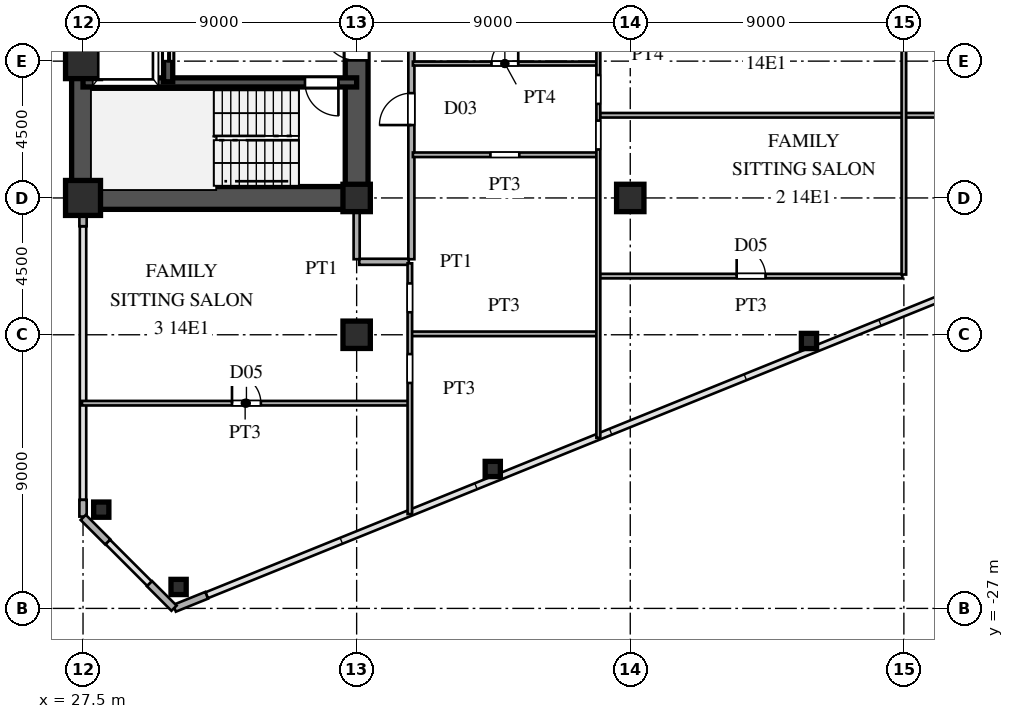
"""IFC4 building model, lengths in metres.
Left out: names, types, materials, properties, quantities, classifications, styles, units other than length and angle.
Written with IfcOpenShell. Run it as: python <this file> out.ifc"""

import sys

from ifc_helpers import new_model, si_unit, direction, frame, frame_2d, origin, origin_2d, place, context, subcontext, project, spatial, rectangle, hollow_rectangle, i_section, extrude, source, transform, mapped, element, fill, save


model = new_model("IFC4")
c1 = context("Model", 3, precision=1e-05, world=origin(), true_north=direction((0.0, 1.0)))
c2 = subcontext(c1, "Body", "Model", "MODEL_VIEW")
j1 = project(units=[si_unit("LENGTHUNIT", "METRE"), si_unit("PLANEANGLEUNIT", "RADIAN")], contexts=[c1])
p1 = place(None, origin())
s1 = spatial("IfcSite", under=j1, at=p1, CompositionType="ELEMENT")
p2 = place(p1, origin())
s2 = spatial("IfcBuilding", under=s1, at=p2, CompositionType="ELEMENT")
p3 = place(p2, frame((0.0, 0.0, 54.9)))
s3 = spatial("IfcBuildingStorey", under=s2, at=p3, CompositionType="ELEMENT", Elevation=54.9)
m1 = source(origin(), c2, "Body", "SweptSolid", [
    extrude(hollow_rectangle(XDim=1.15, YDim=1.15, WallThickness=0.048, at=origin_2d()), origin(), (0.0, 0.0, 1.0), 3.6),
])
for number, where, z_axis, x_axis in (
    (1, (27.5, -13.5, 0.0), (0.0, 0.0, 1.0), (1.0, 0.0, 0.0)),
    (2, (27.5, -9.0, 0.0), (0.0, 0.0, 1.0), (1.0, 0.0, 0.0)),
):
    element("IfcColumn", number, at=place(p3, frame(where, z_axis=z_axis, x_axis=x_axis)), inside=s3, PredefinedType="COLUMN", context=c2, shape_type="MappedRepresentation", body=[
        mapped(m1, transform((0.0, 0.0, 0.0), scale=1.0)),
    ])
m2 = source(origin(), c2, "Body", "SweptSolid", [
    extrude(i_section(OverallWidth=0.9, OverallDepth=0.9, WebThickness=0.036, FlangeThickness=0.055, at=origin_2d()), origin(), (0.0, 0.0, 1.0), 3.6),
])
for number, where, z_axis, x_axis in (
    (3, (36.5, -18.0, 0.0), (0.0, 0.0, 1.0), (1.0, 0.0, 0.0)),
    (4, (36.5, -13.5, 0.0), (0.0, 0.0, 1.0), (1.0, 0.0, 0.0)),
    (5, (45.5, -13.5, 0.0), (0.0, 0.0, 1.0), (1.0, 0.0, 0.0)),
):
    element("IfcColumn", number, at=place(p3, frame(where, z_axis=z_axis, x_axis=x_axis)), inside=s3, PredefinedType="COLUMN", context=c2, shape_type="MappedRepresentation", body=[
        mapped(m2, transform((0.0, 0.0, 0.0), scale=1.0)),
    ])
m3 = source(origin(), c2, "Body", "SweptSolid", [
    extrude(hollow_rectangle(XDim=0.5, YDim=0.5, WallThickness=0.02, at=origin_2d()), origin(), (0.0, 0.0, 1.0), 3.6),
])
for number, where, z_axis, x_axis in (
    (6, (30.643, -26.295, 0.0), (0.0, 0.0, 1.0), (1.0, 0.0, 0.0)),
    (7, (28.1, -23.751, 0.0), (0.0, 0.0, 1.0), (1.0, 0.0, 0.0)),
    (8, (40.977, -22.414, 0.0), (0.0, 0.0, 1.0), (1.0, 0.0, 0.0)),
    (9, (51.378, -18.204, 0.0), (0.0, 0.0, 1.0), (1.0, 0.0, 0.0)),
):
    element("IfcColumn", number, at=place(p3, frame(where, z_axis=z_axis, x_axis=x_axis)), inside=s3, PredefinedType="COLUMN", context=c2, shape_type="MappedRepresentation", body=[
        mapped(m3, transform((0.0, 0.0, 0.0), scale=1.0)),
    ])
p4 = place(p3, frame((30.509, -26.996, 0.0), z_axis=(0.0, 0.0, 1.0), x_axis=(0.927007103665, 0.375043770452, 0.0)))
e10 = element("IfcWall", 10, at=p4, inside=s3, PredefinedType="SOLIDWALL", context=c2, shape_type="SweptSolid", body=[
    extrude(rectangle(XDim=1.14, YDim=0.24, at=frame_2d((0.57, 0.0))), origin(), (0.0, 0.0, 1.0), 3.38),
])
p5 = place(p3, frame((27.5, -23.98, 0.0), z_axis=(0.0, 0.0, 1.0), x_axis=(0.0, 1.0, 0.0)))
e11 = element("IfcWall", 11, at=p5, inside=s3, PredefinedType="SOLIDWALL", context=c2, shape_type="SweptSolid", body=[
    extrude(rectangle(XDim=0.55, YDim=0.24, at=frame_2d((0.275, 0.0))), origin(), (0.0, 0.0, 1.0), 3.38),
])
p6 = place(p3, frame((27.5, -14.43, 0.0), z_axis=(0.0, 0.0, 1.0), x_axis=(0.0, 1.0, 0.0)))
e12 = element("IfcWall", 12, at=p6, inside=s3, PredefinedType="SOLIDWALL", context=c2, shape_type="SweptSolid", body=[
    extrude(rectangle(XDim=0.55, YDim=0.24, at=frame_2d((0.275, 0.0))), origin(), (0.0, 0.0, 1.0), 2.88),
])
for number, where, z_axis, x_axis in (
    (13, (27.507, -24.007, 0.0), (0.0, 0.0, 1.0), (0.707, -0.707, 0.0)),
    (14, (29.687, -26.187, 0.0), (0.0, 0.0, 1.0), (0.707, -0.707, 0.0)),
):
    element("IfcWall", number, at=place(p3, frame(where, z_axis=z_axis, x_axis=x_axis)), inside=s3, PredefinedType="SOLIDWALL", context=c2, shape_type="SweptSolid", body=[
        extrude(rectangle(XDim=1.14, YDim=0.24, at=frame_2d((0.57, 0.0))), origin(), (0.0, 0.0, 1.0), 3.38),
    ])
p7 = place(p3, frame((27.5, -13.5, 0.0), z_axis=(0.0, 0.0, 1.0), x_axis=(0.0, 1.0, 0.0)))
e15 = element("IfcWall", 15, at=p7, inside=s3, PredefinedType="SHEAR", context=c2, shape_type="SweptSolid", body=[
    extrude(rectangle(XDim=12.2, YDim=0.75, at=frame_2d((6.1, 0.0))), origin(), (0.0, 0.0, 1.0), 3.38),
])
p8 = place(p3, frame((27.5, -13.5, 0.0), z_axis=(0.0, 0.0, 1.0), x_axis=(1.0, 0.0, 0.0)))
e16 = element("IfcWall", 16, at=p8, inside=s3, PredefinedType="SHEAR", context=c2, shape_type="SweptSolid", body=[
    extrude(rectangle(XDim=9.0, YDim=0.75, at=frame_2d((4.5, 0.0))), origin(), (0.0, 0.0, 1.0), 3.38),
])
p9 = place(p3, frame((36.5, -13.65, 0.0), z_axis=(0.0, 0.0, 1.0), x_axis=(0.0, 1.0, 0.0)))
e17 = element("IfcWall", 17, at=p9, inside=s3, PredefinedType="SHEAR", context=c2, shape_type="SweptSolid", body=[
    extrude(rectangle(XDim=7.15, YDim=0.75, at=frame_2d((3.575, 0.0))), origin(), (0.0, 0.0, 1.0), 3.38),
])
p10 = place(p9, frame((4.675, 0.0, 0.0)))
e18 = element("IfcOpeningElement", 18, at=p10, cuts=e17, PredefinedType="OPENING", context=c2, shape_type="SweptSolid", body=[
    extrude(rectangle(XDim=1.15, YDim=2.2, at=frame_2d((0.575, 1.1))), frame((0.0, 0.385, 0.0), z_axis=(0.0, -1.0, 0.0), x_axis=(1.0, 0.0, 0.0)), (0.0, 0.0, 1.0), 0.77),
])
p11 = place(p3, frame((27.5, -9.7, 0.0), z_axis=(0.0, 0.0, 1.0), x_axis=(1.0, 0.0, 0.0)))
e19 = element("IfcWall", 19, at=p11, inside=s3, PredefinedType="SHEAR", context=c2, shape_type="SweptSolid", body=[
    extrude(rectangle(XDim=9.0, YDim=0.3, at=frame_2d((4.5, 0.0))), origin(), (0.0, 0.0, 1.0), 3.38),
])
p12 = place(p11, frame((7.3, 0.0, 0.0)))
e20 = element("IfcOpeningElement", 20, at=p12, cuts=e19, PredefinedType="OPENING", context=c2, shape_type="SweptSolid", body=[
    extrude(rectangle(XDim=1.1, YDim=2.2, at=frame_2d((0.55, 1.1))), frame((0.0, 0.16, 0.0), z_axis=(0.0, -1.0, 0.0), x_axis=(1.0, 0.0, 0.0)), (0.0, 0.0, 1.0), 0.32),
])
p13 = place(p3, frame((30.3, -9.68, 0.0), z_axis=(0.0, 0.0, 1.0), x_axis=(0.0, 1.0, 0.0)))
e21 = element("IfcWall", 21, at=p13, inside=s3, PredefinedType="SHEAR", context=c2, shape_type="SweptSolid", body=[
    extrude(rectangle(XDim=2.56, YDim=0.3, at=frame_2d((1.28, 0.0))), origin(), (0.0, 0.0, 1.0), 3.38),
])
p14 = place(p13, frame((0.68, 0.0, 0.0)))
e22 = element("IfcOpeningElement", 22, at=p14, cuts=e21, PredefinedType="OPENING", context=c2, shape_type="SweptSolid", body=[
    extrude(rectangle(XDim=1.2, YDim=2.25, at=frame_2d((0.6, 1.125))), frame((0.0, 0.16, 0.0), z_axis=(0.0, -1.0, 0.0), x_axis=(1.0, 0.0, 0.0)), (0.0, 0.0, 1.0), 0.32),
])
p15 = place(p3, frame((27.465, -20.25, 0.0), z_axis=(0.0, 0.0, 1.0), x_axis=(1.0, 0.0, 0.0)))
e23 = element("IfcWall", 23, at=p15, inside=s3, PredefinedType="PARTITIONING", context=c2, shape_type="SweptSolid", body=[
    extrude(rectangle(XDim=10.735, YDim=0.15, at=frame_2d((5.367, 0.0))), origin(), (0.0, 0.0, 1.0), 3.38),
])
p16 = place(p15, frame((4.935, 0.0, 0.0)))
e24 = element("IfcOpeningElement", 24, at=p16, cuts=e23, PredefinedType="OPENING", context=c2, shape_type="SweptSolid", body=[
    extrude(rectangle(XDim=0.95, YDim=2.15, at=frame_2d((0.475, 1.075))), frame((0.0, 0.085, 0.0), z_axis=(0.0, -1.0, 0.0), x_axis=(1.0, 0.0, 0.0)), (0.0, 0.0, 1.0), 0.17),
])
p17 = place(p3, frame((38.3, -17.97, 0.0), z_axis=(0.0, 0.0, 1.0), x_axis=(1.0, 0.0, 0.0)))
e25 = element("IfcWall", 25, at=p17, inside=s3, PredefinedType="PARTITIONING", context=c2, shape_type="SweptSolid", body=[
    extrude(rectangle(XDim=6.1, YDim=0.15, at=frame_2d((3.05, 0.0))), origin(), (0.0, 0.0, 1.0), 3.38),
])
p18 = place(p3, frame((44.5, -16.07, 0.0), z_axis=(0.0, 0.0, 1.0), x_axis=(1.0, 0.0, 0.0)))
e26 = element("IfcWall", 26, at=p18, inside=s3, PredefinedType="PARTITIONING", context=c2, shape_type="SweptSolid", body=[
    extrude(rectangle(XDim=9.95, YDim=0.15, at=frame_2d((4.975, 0.0))), origin(), (0.0, 0.0, 1.0), 3.38),
])
p19 = place(p18, frame((4.5, 0.0, 0.0)))
e27 = element("IfcOpeningElement", 27, at=p19, cuts=e26, PredefinedType="OPENING", context=c2, shape_type="SweptSolid", body=[
    extrude(rectangle(XDim=0.95, YDim=2.15, at=frame_2d((0.475, 1.075))), frame((0.0, 0.085, 0.0), z_axis=(0.0, -1.0, 0.0), x_axis=(1.0, 0.0, 0.0)), (0.0, 0.0, 1.0), 0.17),
])
p20 = place(p3, frame((36.585, -15.6, 0.0), z_axis=(0.0, 0.0, 1.0), x_axis=(1.0, 0.0, 0.0)))
e28 = element("IfcWall", 28, at=p20, inside=s3, PredefinedType="PARTITIONING", context=c2, shape_type="SweptSolid", body=[
    extrude(rectangle(XDim=1.63, YDim=0.2, at=frame_2d((0.815, 0.0))), origin(), (0.0, 0.0, 1.0), 3.38),
])
p21 = place(p3, frame((38.35, -12.08, 0.0), z_axis=(0.0, 0.0, 1.0), x_axis=(1.0, 0.0, 0.0)))
e29 = element("IfcWall", 29, at=p21, inside=s3, PredefinedType="PARTITIONING", context=c2, shape_type="SweptSolid", body=[
    extrude(rectangle(XDim=6.05, YDim=0.15, at=frame_2d((3.025, 0.0))), origin(), (0.0, 0.0, 1.0), 3.38),
])
p22 = place(p21, frame((2.55, 0.0, 0.0)))
e30 = element("IfcOpeningElement", 30, at=p22, cuts=e29, PredefinedType="OPENING", context=c2, shape_type="SweptSolid", body=[
    extrude(rectangle(XDim=0.95, YDim=2.15, at=frame_2d((0.475, 1.075))), frame((0.0, 0.085, 0.0), z_axis=(0.0, -1.0, 0.0), x_axis=(1.0, 0.0, 0.0)), (0.0, 0.0, 1.0), 0.17),
])
p23 = place(p3, frame((44.5, -10.78, 0.0), z_axis=(0.0, 0.0, 1.0), x_axis=(1.0, 0.0, 0.0)))
e31 = element("IfcWall", 31, at=p23, inside=s3, PredefinedType="PARTITIONING", context=c2, shape_type="SweptSolid", body=[
    extrude(rectangle(XDim=26.097, YDim=0.15, at=frame_2d((13.048, 0.0))), origin(), (0.0, 0.0, 1.0), 3.38),
])
p24 = place(p23, frame((12.375, 0.0, 0.0)))
e32 = element("IfcOpeningElement", 32, at=p24, cuts=e31, PredefinedType="OPENING", context=c2, shape_type="SweptSolid", body=[
    extrude(rectangle(XDim=0.95, YDim=2.15, at=frame_2d((0.475, 1.075))), frame((0.0, 0.085, 0.0), z_axis=(0.0, -1.0, 0.0), x_axis=(1.0, 0.0, 0.0)), (0.0, 0.0, 1.0), 0.17),
])
p25 = place(p3, frame((38.35, -9.08, 0.0), z_axis=(0.0, 0.0, 1.0), x_axis=(1.0, 0.0, 0.0)))
e33 = element("IfcWall", 33, at=p25, inside=s3, PredefinedType="PARTITIONING", context=c2, shape_type="SweptSolid", body=[
    extrude(rectangle(XDim=6.05, YDim=0.13, at=frame_2d((3.025, 0.0))), origin(), (0.0, 0.0, 1.0), 3.38),
])
p26 = place(p25, frame((2.585, 0.0, 0.0)))
e34 = element("IfcOpeningElement", 34, at=p26, cuts=e33, PredefinedType="OPENING", context=c2, shape_type="SweptSolid", body=[
    extrude(rectangle(XDim=0.88, YDim=2.1, at=frame_2d((0.44, 1.05))), frame((0.0, 0.075, 0.0), z_axis=(0.0, -1.0, 0.0), x_axis=(1.0, 0.0, 0.0)), (0.0, 0.0, 1.0), 0.15),
])
p27 = place(p3, frame((36.5, -15.515, 0.0), z_axis=(0.0, 0.0, 1.0), x_axis=(0.0, 1.0, 0.0)))
e35 = element("IfcWall", 35, at=p27, inside=s3, PredefinedType="PARTITIONING", context=c2, shape_type="SweptSolid", body=[
    extrude(rectangle(XDim=1.635, YDim=0.2, at=frame_2d((0.817, 0.0))), origin(), (0.0, 0.0, 1.0), 2.68),
])
p28 = place(p3, frame((38.25, -23.898, 0.0), z_axis=(0.0, 0.0, 1.0), x_axis=(0.0, 1.0, 0.0)))
e36 = element("IfcWall", 36, at=p28, inside=s3, PredefinedType="PARTITIONING", context=c2, shape_type="SweptSolid", body=[
    extrude(rectangle(XDim=8.248, YDim=0.15, at=frame_2d((4.124, 0.0))), origin(), (0.0, 0.0, 1.0), 3.38),
])
p29 = place(p28, frame((6.638, 0.0, 0.0)))
e37 = element("IfcOpeningElement", 37, at=p29, cuts=e36, PredefinedType="OPENING", context=c2, shape_type="SweptSolid", body=[
    extrude(rectangle(XDim=0.95, YDim=2.15, at=frame_2d((0.475, 1.075))), frame((0.0, 0.085, 0.0), z_axis=(0.0, -1.0, 0.0), x_axis=(1.0, 0.0, 0.0)), (0.0, 0.0, 1.0), 0.17),
])
p30 = place(p28, frame((4.313, 0.0, 0.0)))
e38 = element("IfcOpeningElement", 38, at=p30, cuts=e36, PredefinedType="OPENING", context=c2, shape_type="SweptSolid", body=[
    extrude(rectangle(XDim=0.95, YDim=2.15, at=frame_2d((0.475, 1.075))), frame((0.0, 0.085, 0.0), z_axis=(0.0, -1.0, 0.0), x_axis=(1.0, 0.0, 0.0)), (0.0, 0.0, 1.0), 0.17),
])
p31 = place(p3, frame((38.3, -15.515, 0.0), z_axis=(0.0, 0.0, 1.0), x_axis=(0.0, 1.0, 0.0)))
e39 = element("IfcWall", 39, at=p31, inside=s3, PredefinedType="PARTITIONING", context=c2, shape_type="SweptSolid", body=[
    extrude(rectangle(XDim=31.03, YDim=0.2, at=frame_2d((15.515, 0.0))), origin(), (0.0, 0.0, 1.0), 3.38),
])
p32 = place(p31, frame((4.413, 0.0, 0.0)))
e40 = element("IfcOpeningElement", 40, at=p32, cuts=e39, PredefinedType="OPENING", context=c2, shape_type="SweptSolid", body=[
    extrude(rectangle(XDim=1.05, YDim=2.25, at=frame_2d((0.525, 1.125))), frame((0.0, 0.11, 0.0), z_axis=(0.0, -1.0, 0.0), x_axis=(1.0, 0.0, 0.0)), (0.0, 0.0, 1.0), 0.22),
])
p33 = place(p31, frame((16.28, 0.0, 0.0)))
e41 = element("IfcOpeningElement", 41, at=p33, cuts=e39, PredefinedType="OPENING", context=c2, shape_type="SweptSolid", body=[
    extrude(rectangle(XDim=1.05, YDim=2.25, at=frame_2d((0.525, 1.125))), frame((0.0, 0.11, 0.0), z_axis=(0.0, -1.0, 0.0), x_axis=(1.0, 0.0, 0.0)), (0.0, 0.0, 1.0), 0.22),
])
p34 = place(p31, frame((27.635, 0.0, 0.0)))
e42 = element("IfcOpeningElement", 42, at=p34, cuts=e39, PredefinedType="OPENING", context=c2, shape_type="SweptSolid", body=[
    extrude(rectangle(XDim=1.05, YDim=2.25, at=frame_2d((0.525, 1.125))), frame((0.0, 0.11, 0.0), z_axis=(0.0, -1.0, 0.0), x_axis=(1.0, 0.0, 0.0)), (0.0, 0.0, 1.0), 0.22),
])
p35 = place(p3, frame((44.45, -21.389, 0.0), z_axis=(0.0, 0.0, 1.0), x_axis=(0.0, 1.0, 0.0)))
e43 = element("IfcWall", 43, at=p35, inside=s3, PredefinedType="PARTITIONING", context=c2, shape_type="SweptSolid", body=[
    extrude(rectangle(XDim=25.172, YDim=0.13, at=frame_2d((12.586, 0.0))), origin(), (0.0, 0.0, 1.0), 3.38),
])
p36 = place(p35, frame((10.983, 0.0, 0.0)))
e44 = element("IfcOpeningElement", 44, at=p36, cuts=e43, PredefinedType="OPENING", context=c2, shape_type="SweptSolid", body=[
    extrude(rectangle(XDim=0.95, YDim=2.15, at=frame_2d((0.475, 1.075))), frame((0.0, 0.075, 0.0), z_axis=(0.0, -1.0, 0.0), x_axis=(1.0, 0.0, 0.0)), (0.0, 0.0, 1.0), 0.15),
])
p37 = place(p35, frame((9.483, 0.0, 0.0)))
e45 = element("IfcOpeningElement", 45, at=p37, cuts=e43, PredefinedType="OPENING", context=c2, shape_type="SweptSolid", body=[
    extrude(rectangle(XDim=0.95, YDim=2.15, at=frame_2d((0.475, 1.075))), frame((0.0, 0.075, 0.0), z_axis=(0.0, -1.0, 0.0), x_axis=(1.0, 0.0, 0.0)), (0.0, 0.0, 1.0), 0.15),
])
p38 = place(p35, frame((22.414, 0.0, 0.0)))
e46 = element("IfcOpeningElement", 46, at=p38, cuts=e43, PredefinedType="OPENING", context=c2, shape_type="SweptSolid", body=[
    extrude(rectangle(XDim=0.95, YDim=2.15, at=frame_2d((0.475, 1.075))), frame((0.0, 0.075, 0.0), z_axis=(0.0, -1.0, 0.0), x_axis=(1.0, 0.0, 0.0)), (0.0, 0.0, 1.0), 0.15),
])
p39 = place(p3, frame((54.5, -16.019, 0.0), z_axis=(0.0, 0.0, 1.0), x_axis=(0.0, 1.0, 0.0)))
e47 = element("IfcWall", 47, at=p39, inside=s3, PredefinedType="PARTITIONING", context=c2, shape_type="SweptSolid", body=[
    extrude(rectangle(XDim=33.038, YDim=0.15, at=frame_2d((16.519, 0.0))), origin(), (0.0, 0.0, 1.0), 2.68),
])
p40 = place(p39, frame((7.402, 0.0, 0.0)))
e48 = element("IfcOpeningElement", 48, at=p40, cuts=e47, PredefinedType="OPENING", context=c2, shape_type="SweptSolid", body=[
    extrude(rectangle(XDim=0.95, YDim=2.15, at=frame_2d((0.475, 1.075))), frame((0.0, 0.085, 0.0), z_axis=(0.0, -1.0, 0.0), x_axis=(1.0, 0.0, 0.0)), (0.0, 0.0, 1.0), 0.17),
])
p41 = place(p39, frame((17.044, 0.0, 0.0)))
e49 = element("IfcOpeningElement", 49, at=p41, cuts=e47, PredefinedType="OPENING", context=c2, shape_type="SweptSolid", body=[
    extrude(rectangle(XDim=0.95, YDim=2.15, at=frame_2d((0.475, 1.075))), frame((0.0, 0.085, 0.0), z_axis=(0.0, -1.0, 0.0), x_axis=(1.0, 0.0, 0.0)), (0.0, 0.0, 1.0), 0.17),
])
p42 = place(p39, frame((26.186, 0.0, 0.0)))
e50 = element("IfcOpeningElement", 50, at=p42, cuts=e47, PredefinedType="OPENING", context=c2, shape_type="SweptSolid", body=[
    extrude(rectangle(XDim=0.95, YDim=2.15, at=frame_2d((0.475, 1.075))), frame((0.0, 0.085, 0.0), z_axis=(0.0, -1.0, 0.0), x_axis=(1.0, 0.0, 0.0)), (0.0, 0.0, 1.0), 0.17),
])
m4 = source(origin(), c2, "Body", "SweptSolid", [
    extrude(rectangle(XDim=1.15, YDim=2.2, at=frame_2d((0.575, 1.1))), frame((0.0, 0.025, 0.0), z_axis=(0.0, -1.0, 0.0), x_axis=(1.0, 0.0, 0.0)), (0.0, 0.0, 1.0), 0.05),
])
p43 = place(p10, origin())
e51 = element("IfcDoor", 51, at=p43, inside=s3, OperationType="SINGLE_SWING_RIGHT", PredefinedType="DOOR", context=c2, shape_type="MappedRepresentation", body=[
    mapped(m4, transform((0.0, 0.0, 0.0), scale=1.0)),
])
fill(e18, e51)
m5 = source(origin(), c2, "Body", "SweptSolid", [
    extrude(rectangle(XDim=1.1, YDim=2.2, at=frame_2d((0.55, 1.1))), frame((0.0, 0.025, 0.0), z_axis=(0.0, -1.0, 0.0), x_axis=(1.0, 0.0, 0.0)), (0.0, 0.0, 1.0), 0.05),
])
p44 = place(p12, frame((1.1, 0.0, 0.0), z_axis=(0.0, 0.0, 1.0), x_axis=(-1.0, 0.0, 0.0)))
e52 = element("IfcDoor", 52, at=p44, inside=s3, OperationType="SINGLE_SWING_RIGHT", PredefinedType="DOOR", context=c2, shape_type="MappedRepresentation", body=[
    mapped(m5, transform((0.0, 0.0, 0.0), scale=1.0)),
])
fill(e20, e52)
m6 = source(origin(), c2, "Body", "SweptSolid", [
    extrude(rectangle(XDim=1.2, YDim=2.25, at=frame_2d((0.6, 1.125))), frame((0.0, 0.025, 0.0), z_axis=(0.0, -1.0, 0.0), x_axis=(1.0, 0.0, 0.0)), (0.0, 0.0, 1.0), 0.05),
])
p45 = place(p14, origin())
e53 = element("IfcDoor", 53, at=p45, inside=s3, OperationType="DOUBLE_DOOR_SLIDING", PredefinedType="DOOR", context=c2, shape_type="MappedRepresentation", body=[
    mapped(m6, transform((0.0, 0.0, 0.0), scale=1.0)),
])
fill(e22, e53)
m7 = source(origin(), c2, "Body", "SweptSolid", [
    extrude(rectangle(XDim=0.95, YDim=2.15, at=frame_2d((0.475, 1.075))), frame((0.0, 0.025, 0.0), z_axis=(0.0, -1.0, 0.0), x_axis=(1.0, 0.0, 0.0)), (0.0, 0.0, 1.0), 0.05),
])
p46 = place(p16, origin())
e54 = element("IfcDoor", 54, at=p46, inside=s3, OperationType="SINGLE_SWING_LEFT", PredefinedType="DOOR", context=c2, shape_type="MappedRepresentation", body=[
    mapped(m7, transform((0.0, 0.0, 0.0), scale=1.0)),
])
fill(e24, e54)
p47 = place(p19, origin())
e55 = element("IfcDoor", 55, at=p47, inside=s3, OperationType="SINGLE_SWING_LEFT", PredefinedType="DOOR", context=c2, shape_type="MappedRepresentation", body=[
    mapped(m7, transform((0.0, 0.0, 0.0), scale=1.0)),
])
fill(e27, e55)
m8 = source(origin(), c2, "Body", "SweptSolid", [
    extrude(rectangle(XDim=0.88, YDim=2.1, at=frame_2d((0.44, 1.05))), frame((0.0, 0.025, 0.0), z_axis=(0.0, -1.0, 0.0), x_axis=(1.0, 0.0, 0.0)), (0.0, 0.0, 1.0), 0.05),
])
p48 = place(p26, origin())
e56 = element("IfcDoor", 56, at=p48, inside=s3, OperationType="SINGLE_SWING_RIGHT", PredefinedType="DOOR", context=c2, shape_type="MappedRepresentation", body=[
    mapped(m8, transform((0.0, 0.0, 0.0), scale=1.0)),
])
fill(e34, e56)
m9 = source(origin(), c2, "Body", "SweptSolid", [
    extrude(rectangle(XDim=1.05, YDim=2.25, at=frame_2d((0.525, 1.125))), frame((0.0, 0.025, 0.0), z_axis=(0.0, -1.0, 0.0), x_axis=(1.0, 0.0, 0.0)), (0.0, 0.0, 1.0), 0.05),
])
p49 = place(p32, origin())
e57 = element("IfcDoor", 57, at=p49, inside=s3, OperationType="SINGLE_SWING_LEFT", PredefinedType="DOOR", context=c2, shape_type="MappedRepresentation", body=[
    mapped(m9, transform((0.0, 0.0, 0.0), scale=1.0)),
])
fill(e40, e57)
save(model, sys.argv[1])
